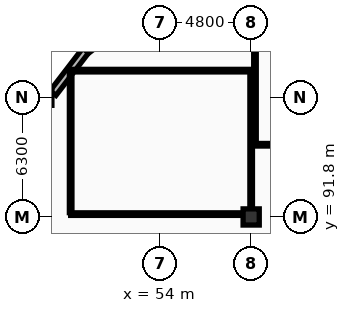
"""IFC4 building model, lengths in metres.
Left out: names, types, materials, properties, quantities, classifications, styles, units other than length and angle.
Written with IfcOpenShell. Run it as: python <this file> out.ifc"""

import sys

from ifc_helpers import new_model, si_unit, direction, frame, frame_2d, origin, origin_2d, place, context, subcontext, project, spatial, rectangle, circle, extrude, element, fill, save


model = new_model("IFC4")
c1 = context("Model", 3, precision=1e-05, world=origin(), true_north=direction((0.0, 1.0)))
c2 = subcontext(c1, "Body", "Model", "MODEL_VIEW")
j1 = project(units=[si_unit("LENGTHUNIT", "METRE"), si_unit("PLANEANGLEUNIT", "RADIAN")], contexts=[c1])
p1 = place(None, origin())
s1 = spatial("IfcSite", under=j1, at=p1, CompositionType="ELEMENT")
p2 = place(p1, origin())
s2 = spatial("IfcBuilding", under=s1, at=p2, CompositionType="ELEMENT")
p3 = place(p2, origin())
s3 = spatial("IfcBuildingStorey", under=s2, at=p3, CompositionType="ELEMENT", Elevation=0.0)
p4 = place(p3, frame((58.8, 91.8, 0.0), z_axis=(0.0, 0.0, 1.0), x_axis=(1.0, 0.0, 0.0)))
e1 = element("IfcColumn", 1, at=p4, inside=s3, PredefinedType="COLUMN", context=c2, shape_type="SweptSolid", body=[
    extrude(rectangle(XDim=0.85, YDim=0.85, at=origin_2d()), origin(), (0.0, 0.0, 1.0), 5.4),
])
p5 = place(p3, frame((47.888, 98.1, 0.0), z_axis=(0.0, 0.0, 1.0), x_axis=(1.0, 0.0, 0.0)))
e2 = element("IfcColumn", 2, at=p5, inside=s3, PredefinedType="COLUMN", context=c2, shape_type="SweptSolid", body=[
    extrude(circle(Radius=0.425, at=origin_2d()), origin(), (0.0, 0.0, 1.0), 5.4),
])
p6 = place(p3, frame((52.283, 102.23, 0.0), z_axis=(0.0, 0.0, 1.0), x_axis=(-0.793343310116, -0.608774500364, 0.0)))
e3 = element("IfcWall", 3, at=p6, inside=s3, PredefinedType="ELEMENTEDWALL", context=c2, shape_type="SweptSolid", body=[
    extrude(rectangle(XDim=2.824, YDim=0.395, at=frame_2d((1.412, 0.0))), origin(), (0.0, 0.0, 1.0), 4.17),
])
p7 = place(p6, frame((0.962, 0.0, 0.85)))
e4 = element("IfcOpeningElement", 4, at=p7, cuts=e3, PredefinedType="OPENING", context=c2, shape_type="SweptSolid", body=[
    extrude(rectangle(XDim=0.9, YDim=1.85, at=frame_2d((0.45, 0.925))), frame((0.0, 0.208, 0.0), z_axis=(0.0, -1.0, 0.0), x_axis=(1.0, 0.0, 0.0)), (0.0, 0.0, 1.0), 0.415),
])
p8 = place(p3, frame((50.089, 100.557, 0.0), z_axis=(0.0, 0.0, 1.0), x_axis=(-0.608787157184, -0.793333597705, 0.0)))
e5 = element("IfcWall", 5, at=p8, inside=s3, PredefinedType="ELEMENTEDWALL", context=c2, shape_type="SweptSolid", body=[
    extrude(rectangle(XDim=2.824, YDim=0.395, at=frame_2d((1.412, 0.0))), origin(), (0.0, 0.0, 1.0), 4.27),
])
p9 = place(p3, frame((72.4, 95.6, 0.0), z_axis=(0.0, 0.0, 1.0), x_axis=(-1.0, 0.0, 0.0)))
e6 = element("IfcWall", 6, at=p9, inside=s3, PredefinedType="PARTITIONING", context=c2, shape_type="SweptSolid", body=[
    extrude(rectangle(XDim=13.4, YDim=0.135, at=frame_2d((6.7, 0.0))), origin(), (0.0, 0.0, 1.0), 4.27),
])
p10 = place(p3, frame((59.0, 95.677, 0.0), z_axis=(0.0, 0.0, 1.0), x_axis=(0.0, 1.0, 0.0)))
e7 = element("IfcWall", 7, at=p10, inside=s3, PredefinedType="PARTITIONING", context=c2, shape_type="SweptSolid", body=[
    extrude(rectangle(XDim=7.845, YDim=0.135, at=frame_2d((3.922, 0.0))), origin(), (0.0, 0.0, 1.0), 4.27),
])
p11 = place(p3, frame((49.3, 99.5, 0.0), z_axis=(0.0, 0.0, 1.0), x_axis=(1.0, 0.0, 0.0)))
e8 = element("IfcWall", 8, at=p11, inside=s3, PredefinedType="PARTITIONING", context=c2, shape_type="SweptSolid", body=[
    extrude(rectangle(XDim=9.5, YDim=0.135, at=frame_2d((4.75, 0.0))), origin(), (0.0, 0.0, 1.0), 4.17),
])
p12 = place(p3, frame((58.8, 91.95, 0.0), z_axis=(0.0, 0.0, 1.0), x_axis=(-1.0, 0.0, 0.0)))
e9 = element("IfcWall", 9, at=p12, inside=s3, PredefinedType="PARTITIONING", context=c2, shape_type="SweptSolid", body=[
    extrude(rectangle(XDim=9.5, YDim=0.135, at=frame_2d((4.75, 0.0))), origin(), (0.0, 0.0, 1.0), 4.17),
])
p13 = place(p12, frame((3.073, 0.0, 0.0)))
e10 = element("IfcOpeningElement", 10, at=p13, cuts=e9, PredefinedType="OPENING", context=c2, shape_type="SweptSolid", body=[
    extrude(rectangle(XDim=1.02, YDim=2.15, at=frame_2d((0.51, 1.075))), frame((0.0, 0.077, 0.0), z_axis=(0.0, -1.0, 0.0), x_axis=(1.0, 0.0, 0.0)), (0.0, 0.0, 1.0), 0.155),
])
for number, where, z_axis, x_axis in (
    (11, (49.3, 92.028, 0.0), (0.0, 0.0, 1.0), (0.0, 1.0, 0.0)),
    (12, (58.8, 99.423, 0.0), (0.0, 0.0, 1.0), (0.0, -1.0, 0.0)),
):
    element("IfcWall", number, at=place(p3, frame(where, z_axis=z_axis, x_axis=x_axis)), inside=s3, PredefinedType="PARTITIONING", context=c2, shape_type="SweptSolid", body=[
        extrude(rectangle(XDim=7.395, YDim=0.135, at=frame_2d((3.698, 0.0))), origin(), (0.0, 0.0, 1.0), 4.27),
    ])
p14 = place(p13, origin())
e13 = element("IfcDoor", 13, at=p14, inside=s3, OperationType="SINGLE_SWING_LEFT", PredefinedType="DOOR", context=c2, shape_type="SweptSolid", body=[
    extrude(rectangle(XDim=1.02, YDim=2.15, at=frame_2d((0.51, 1.075))), frame((0.0, 0.025, 0.0), z_axis=(0.0, -1.0, 0.0), x_axis=(1.0, 0.0, 0.0)), (0.0, 0.0, 1.0), 0.05),
])
fill(e10, e13)
save(model, sys.argv[1])
